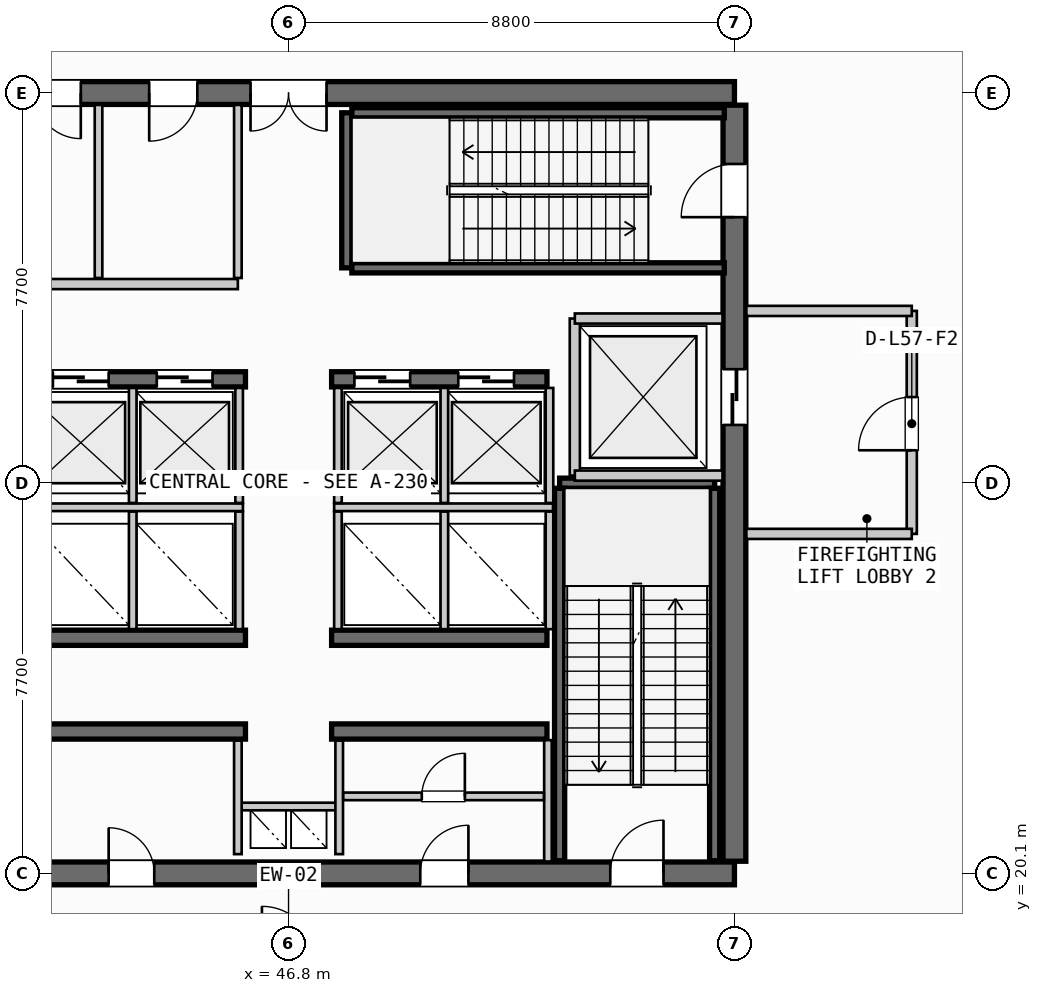
"""IFC4 building model, lengths in metres.
Left out: names, types, materials, properties, quantities, classifications, styles, units other than length and angle.
Written with IfcOpenShell. Run it as: python <this file> out.ifc"""

import sys

from ifc_helpers import new_model, si_unit, direction, frame, frame_2d, origin, place, context, subcontext, project, spatial, rectangle, extrude, source, transform, mapped, element, fill, save


model = new_model("IFC4")
c1 = context("Model", 3, precision=1e-05, world=origin(), true_north=direction((0.0, 1.0)))
c2 = subcontext(c1, "Body", "Model", "MODEL_VIEW")
j1 = project(units=[si_unit("LENGTHUNIT", "METRE"), si_unit("PLANEANGLEUNIT", "RADIAN")], contexts=[c1])
p1 = place(None, origin())
s1 = spatial("IfcSite", under=j1, at=p1, CompositionType="ELEMENT")
p2 = place(p1, origin())
s2 = spatial("IfcBuilding", under=s1, at=p2, CompositionType="ELEMENT")
p3 = place(p2, frame((0.0, 0.0, 218.4)))
s3 = spatial("IfcBuildingStorey", under=s2, at=p3, CompositionType="ELEMENT", Elevation=218.4)
p4 = place(p3, frame((38.0, 20.1, 0.0), z_axis=(0.0, 0.0, 1.0), x_axis=(1.0, 0.0, 0.0)))
e1 = element("IfcWall", 1, at=p4, inside=s3, PredefinedType="SHEAR", context=c2, shape_type="SweptSolid", body=[
    extrude(rectangle(XDim=17.6, YDim=0.45, at=frame_2d((8.8, 0.0))), origin(), (0.0, 0.0, 1.0), 4.89),
])
p5 = place(p4, frame((1.4, 0.0, 0.0)))
e2 = element("IfcOpeningElement", 2, at=p5, cuts=e1, PredefinedType="OPENING", context=c2, shape_type="SweptSolid", body=[
    extrude(rectangle(XDim=1.05, YDim=2.15, at=frame_2d((0.525, 1.075))), frame((0.0, 0.235, 0.0), z_axis=(0.0, -1.0, 0.0), x_axis=(1.0, 0.0, 0.0)), (0.0, 0.0, 1.0), 0.47),
])
p6 = place(p4, frame((15.15, 0.0, 0.0)))
e3 = element("IfcOpeningElement", 3, at=p6, cuts=e1, PredefinedType="OPENING", context=c2, shape_type="SweptSolid", body=[
    extrude(rectangle(XDim=1.05, YDim=2.15, at=frame_2d((0.525, 1.075))), frame((0.0, 0.235, 0.0), z_axis=(0.0, -1.0, 0.0), x_axis=(1.0, 0.0, 0.0)), (0.0, 0.0, 1.0), 0.47),
])
p7 = place(p4, frame((5.25, 0.0, 0.0)))
e4 = element("IfcOpeningElement", 4, at=p7, cuts=e1, PredefinedType="OPENING", context=c2, shape_type="SweptSolid", body=[
    extrude(rectangle(XDim=0.9, YDim=2.15, at=frame_2d((0.45, 1.075))), frame((0.0, 0.235, 0.0), z_axis=(0.0, -1.0, 0.0), x_axis=(1.0, 0.0, 0.0)), (0.0, 0.0, 1.0), 0.47),
])
p8 = place(p4, frame((11.4, 0.0, 0.0)))
e5 = element("IfcOpeningElement", 5, at=p8, cuts=e1, PredefinedType="OPENING", context=c2, shape_type="SweptSolid", body=[
    extrude(rectangle(XDim=0.95, YDim=2.15, at=frame_2d((0.475, 1.075))), frame((0.0, 0.235, 0.0), z_axis=(0.0, -1.0, 0.0), x_axis=(1.0, 0.0, 0.0)), (0.0, 0.0, 1.0), 0.47),
])
p9 = place(p3, frame((55.6, 35.5, 0.0), z_axis=(0.0, 0.0, 1.0), x_axis=(-1.0, 0.0, 0.0)))
e6 = element("IfcWall", 6, at=p9, inside=s3, PredefinedType="SHEAR", context=c2, shape_type="SweptSolid", body=[
    extrude(rectangle(XDim=17.6, YDim=0.45, at=frame_2d((8.8, 0.0))), origin(), (0.0, 0.0, 1.0), 4.89),
])
p10 = place(p9, frame((8.05, 0.0, 0.0)))
e7 = element("IfcOpeningElement", 7, at=p10, cuts=e6, PredefinedType="OPENING", context=c2, shape_type="SweptSolid", body=[
    extrude(rectangle(XDim=1.5, YDim=2.2, at=frame_2d((0.75, 1.1))), frame((0.0, 0.235, 0.0), z_axis=(0.0, -1.0, 0.0), x_axis=(1.0, 0.0, 0.0)), (0.0, 0.0, 1.0), 0.47),
])
p11 = place(p9, frame((15.1, 0.0, 0.0)))
e8 = element("IfcOpeningElement", 8, at=p11, cuts=e6, PredefinedType="OPENING", context=c2, shape_type="SweptSolid", body=[
    extrude(rectangle(XDim=0.95, YDim=2.15, at=frame_2d((0.475, 1.075))), frame((0.0, 0.235, 0.0), z_axis=(0.0, -1.0, 0.0), x_axis=(1.0, 0.0, 0.0)), (0.0, 0.0, 1.0), 0.47),
])
p12 = place(p9, frame((12.9, 0.0, 0.0)))
e9 = element("IfcOpeningElement", 9, at=p12, cuts=e6, PredefinedType="OPENING", context=c2, shape_type="SweptSolid", body=[
    extrude(rectangle(XDim=0.9, YDim=2.15, at=frame_2d((0.45, 1.075))), frame((0.0, 0.235, 0.0), z_axis=(0.0, -1.0, 0.0), x_axis=(1.0, 0.0, 0.0)), (0.0, 0.0, 1.0), 0.47),
])
p13 = place(p9, frame((10.6, 0.0, 0.0)))
e10 = element("IfcOpeningElement", 10, at=p13, cuts=e6, PredefinedType="OPENING", context=c2, shape_type="SweptSolid", body=[
    extrude(rectangle(XDim=0.95, YDim=2.15, at=frame_2d((0.475, 1.075))), frame((0.0, 0.235, 0.0), z_axis=(0.0, -1.0, 0.0), x_axis=(1.0, 0.0, 0.0)), (0.0, 0.0, 1.0), 0.47),
])
p14 = place(p3, frame((55.6, 20.34, 0.0), z_axis=(0.0, 0.0, 1.0), x_axis=(0.0, 1.0, 0.0)))
e11 = element("IfcWall", 11, at=p14, inside=s3, PredefinedType="SHEAR", context=c2, shape_type="SweptSolid", body=[
    extrude(rectangle(XDim=14.92, YDim=0.45, at=frame_2d((7.46, 0.0))), origin(), (0.0, 0.0, 1.0), 4.89),
])
p15 = place(p14, frame((12.71, 0.0, 0.0)))
e12 = element("IfcOpeningElement", 12, at=p15, cuts=e11, PredefinedType="OPENING", context=c2, shape_type="SweptSolid", body=[
    extrude(rectangle(XDim=1.05, YDim=2.15, at=frame_2d((0.525, 1.075))), frame((0.0, 0.235, 0.0), z_axis=(0.0, -1.0, 0.0), x_axis=(1.0, 0.0, 0.0)), (0.0, 0.0, 1.0), 0.47),
])
p16 = place(p14, frame((8.61, 0.0, 0.0)))
e13 = element("IfcOpeningElement", 13, at=p16, cuts=e11, PredefinedType="OPENING", context=c2, shape_type="SweptSolid", body=[
    extrude(rectangle(XDim=1.1, YDim=2.2, at=frame_2d((0.55, 1.1))), frame((0.0, 0.235, 0.0), z_axis=(0.0, -1.0, 0.0), x_axis=(1.0, 0.0, 0.0)), (0.0, 0.0, 1.0), 0.47),
])
for number, where, z_axis, x_axis in (
    (14, (41.7, 22.9, 0.0), (0.0, 0.0, 1.0), (1.0, 0.0, 0.0)),
    (15, (47.65, 22.9, 0.0), (0.0, 0.0, 1.0), (1.0, 0.0, 0.0)),
    (16, (41.7, 24.75, 0.0), (0.0, 0.0, 1.0), (1.0, 0.0, 0.0)),
    (17, (47.65, 24.75, 0.0), (0.0, 0.0, 1.0), (1.0, 0.0, 0.0)),
):
    element("IfcWall", number, at=place(p3, frame(where, z_axis=z_axis, x_axis=x_axis)), inside=s3, PredefinedType="SHEAR", context=c2, shape_type="SweptSolid", body=[
        extrude(rectangle(XDim=4.25, YDim=0.3, at=frame_2d((2.125, 0.0))), origin(), (0.0, 0.0, 1.0), 4.89),
    ])
p17 = place(p3, frame((41.7, 29.85, 0.0), z_axis=(0.0, 0.0, 1.0), x_axis=(1.0, 0.0, 0.0)))
e18 = element("IfcWall", 18, at=p17, inside=s3, PredefinedType="SHEAR", context=c2, shape_type="SweptSolid", body=[
    extrude(rectangle(XDim=4.25, YDim=0.3, at=frame_2d((2.125, 0.0))), origin(), (0.0, 0.0, 1.0), 4.89),
])
p18 = place(p17, frame((0.45, 0.0, 0.0)))
e19 = element("IfcOpeningElement", 19, at=p18, cuts=e18, PredefinedType="OPENING", context=c2, shape_type="SweptSolid", body=[
    extrude(rectangle(XDim=1.1, YDim=2.2, at=frame_2d((0.55, 1.1))), frame((0.0, 0.16, 0.0), z_axis=(0.0, -1.0, 0.0), x_axis=(1.0, 0.0, 0.0)), (0.0, 0.0, 1.0), 0.32),
])
p19 = place(p17, frame((2.5, 0.0, 0.0)))
e20 = element("IfcOpeningElement", 20, at=p19, cuts=e18, PredefinedType="OPENING", context=c2, shape_type="SweptSolid", body=[
    extrude(rectangle(XDim=1.1, YDim=2.2, at=frame_2d((0.55, 1.1))), frame((0.0, 0.16, 0.0), z_axis=(0.0, -1.0, 0.0), x_axis=(1.0, 0.0, 0.0)), (0.0, 0.0, 1.0), 0.32),
])
p20 = place(p3, frame((47.65, 29.85, 0.0), z_axis=(0.0, 0.0, 1.0), x_axis=(1.0, 0.0, 0.0)))
e21 = element("IfcWall", 21, at=p20, inside=s3, PredefinedType="SHEAR", context=c2, shape_type="SweptSolid", body=[
    extrude(rectangle(XDim=4.25, YDim=0.3, at=frame_2d((2.125, 0.0))), origin(), (0.0, 0.0, 1.0), 4.89),
])
p21 = place(p20, frame((0.45, 0.0, 0.0)))
e22 = element("IfcOpeningElement", 22, at=p21, cuts=e21, PredefinedType="OPENING", context=c2, shape_type="SweptSolid", body=[
    extrude(rectangle(XDim=1.1, YDim=2.2, at=frame_2d((0.55, 1.1))), frame((0.0, 0.16, 0.0), z_axis=(0.0, -1.0, 0.0), x_axis=(1.0, 0.0, 0.0)), (0.0, 0.0, 1.0), 0.32),
])
p22 = place(p20, frame((2.5, 0.0, 0.0)))
e23 = element("IfcOpeningElement", 23, at=p22, cuts=e21, PredefinedType="OPENING", context=c2, shape_type="SweptSolid", body=[
    extrude(rectangle(XDim=1.1, YDim=2.2, at=frame_2d((0.55, 1.1))), frame((0.0, 0.16, 0.0), z_axis=(0.0, -1.0, 0.0), x_axis=(1.0, 0.0, 0.0)), (0.0, 0.0, 1.0), 0.32),
])
p23 = place(p3, frame((52.15, 27.8, 0.0), z_axis=(0.0, 0.0, 1.0), x_axis=(1.0, 0.0, 0.0)))
e24 = element("IfcWall", 24, at=p23, inside=s3, PredefinedType="SHEAR", context=c2, shape_type="SweptSolid", body=[
    extrude(rectangle(XDim=3.06, YDim=0.2, at=frame_2d((1.53, 0.0))), origin(), (0.0, 0.0, 1.0), 4.89),
])
for number, where, z_axis, x_axis in (
    (25, (55.21, 27.7, 0.0), (0.0, 0.0, 1.0), (0.0, -1.0, 0.0)),
    (26, (52.15, 20.35, 0.0), (0.0, 0.0, 1.0), (0.0, 1.0, 0.0)),
):
    element("IfcWall", number, at=place(p3, frame(where, z_axis=z_axis, x_axis=x_axis)), inside=s3, PredefinedType="SHEAR", context=c2, shape_type="SweptSolid", body=[
        extrude(rectangle(XDim=7.35, YDim=0.2, at=frame_2d((3.675, 0.0))), origin(), (0.0, 0.0, 1.0), 4.89),
    ])
p24 = place(p3, frame((47.95, 32.05, 0.0), z_axis=(0.0, 0.0, 1.0), x_axis=(0.0, 1.0, 0.0)))
e27 = element("IfcWall", 27, at=p24, inside=s3, PredefinedType="SHEAR", context=c2, shape_type="SweptSolid", body=[
    extrude(rectangle(XDim=3.06, YDim=0.2, at=frame_2d((1.53, 0.0))), origin(), (0.0, 0.0, 1.0), 4.89),
])
for number, where, z_axis, x_axis in (
    (28, (48.05, 35.11, 0.0), (0.0, 0.0, 1.0), (1.0, 0.0, 0.0)),
    (29, (55.4, 32.05, 0.0), (0.0, 0.0, 1.0), (-1.0, 0.0, 0.0)),
):
    element("IfcWall", number, at=place(p3, frame(where, z_axis=z_axis, x_axis=x_axis)), inside=s3, PredefinedType="SHEAR", context=c2, shape_type="SweptSolid", body=[
        extrude(rectangle(XDim=7.35, YDim=0.2, at=frame_2d((3.675, 0.0))), origin(), (0.0, 0.0, 1.0), 4.89),
    ])
p25 = place(p3, frame((45.8, 21.42, 0.0), z_axis=(0.0, 0.0, 1.0), x_axis=(1.0, 0.0, 0.0)))
e30 = element("IfcWall", 30, at=p25, inside=s3, PredefinedType="PARTITIONING", context=c2, shape_type="SweptSolid", body=[
    extrude(rectangle(XDim=2.0, YDim=0.15, at=frame_2d((1.0, 0.0))), origin(), (0.0, 0.0, 1.0), 4.265),
])
for number, where, z_axis, x_axis in (
    (31, (45.8, 20.48, 0.0), (0.0, 0.0, 1.0), (0.0, 1.0, 0.0)),
    (32, (47.8, 20.48, 0.0), (0.0, 0.0, 1.0), (0.0, 1.0, 0.0)),
):
    element("IfcWall", number, at=place(p3, frame(where, z_axis=z_axis, x_axis=x_axis)), inside=s3, PredefinedType="PARTITIONING", context=c2, shape_type="SweptSolid", body=[
        extrude(rectangle(XDim=2.24, YDim=0.15, at=frame_2d((1.12, 0.0))), origin(), (0.0, 0.0, 1.0), 4.265),
    ])
p26 = place(p3, frame((52.45, 27.95, 0.0), z_axis=(0.0, 0.0, 1.0), x_axis=(0.0, 1.0, 0.0)))
e33 = element("IfcWall", 33, at=p26, inside=s3, PredefinedType="PARTITIONING", context=c2, shape_type="SweptSolid", body=[
    extrude(rectangle(XDim=3.1, YDim=0.2, at=frame_2d((1.55, 0.0))), origin(), (0.0, 0.0, 1.0), 4.265),
])
for number, where, z_axis, x_axis in (
    (34, (52.45, 27.95, 0.0), (0.0, 0.0, 1.0), (1.0, 0.0, 0.0)),
    (35, (52.45, 31.05, 0.0), (0.0, 0.0, 1.0), (1.0, 0.0, 0.0)),
):
    element("IfcWall", number, at=place(p3, frame(where, z_axis=z_axis, x_axis=x_axis)), inside=s3, PredefinedType="PARTITIONING", context=c2, shape_type="SweptSolid", body=[
        extrude(rectangle(XDim=2.915, YDim=0.2, at=frame_2d((1.458, 0.0))), origin(), (0.0, 0.0, 1.0), 4.265),
    ])
p27 = place(p3, frame((59.1, 26.8, 0.0), z_axis=(0.0, 0.0, 1.0), x_axis=(0.0, 1.0, 0.0)))
e36 = element("IfcWall", 36, at=p27, inside=s3, PredefinedType="PARTITIONING", context=c2, shape_type="SweptSolid", body=[
    extrude(rectangle(XDim=4.4, YDim=0.2, at=frame_2d((2.2, 0.0))), origin(), (0.0, 0.0, 1.0), 4.265),
])
p28 = place(p27, frame((1.65, 0.0, 0.0)))
e37 = element("IfcOpeningElement", 37, at=p28, cuts=e36, PredefinedType="OPENING", context=c2, shape_type="SweptSolid", body=[
    extrude(rectangle(XDim=1.05, YDim=2.15, at=frame_2d((0.525, 1.075))), frame((0.0, 0.11, 0.0), z_axis=(0.0, -1.0, 0.0), x_axis=(1.0, 0.0, 0.0)), (0.0, 0.0, 1.0), 0.22),
])
for number, where, z_axis, x_axis in (
    (38, (55.835, 26.8, 0.0), (0.0, 0.0, 1.0), (1.0, 0.0, 0.0)),
    (39, (55.835, 31.2, 0.0), (0.0, 0.0, 1.0), (1.0, 0.0, 0.0)),
):
    element("IfcWall", number, at=place(p3, frame(where, z_axis=z_axis, x_axis=x_axis)), inside=s3, PredefinedType="PARTITIONING", context=c2, shape_type="SweptSolid", body=[
        extrude(rectangle(XDim=3.265, YDim=0.2, at=frame_2d((1.633, 0.0))), origin(), (0.0, 0.0, 1.0), 4.265),
    ])
p29 = place(p3, frame((51.92, 20.335, 0.0), z_axis=(0.0, 0.0, 1.0), x_axis=(0.0, 1.0, 0.0)))
e40 = element("IfcWall", 40, at=p29, inside=s3, PredefinedType="PARTITIONING", context=c2, shape_type="SweptSolid", body=[
    extrude(rectangle(XDim=2.395, YDim=0.15, at=frame_2d((1.198, 0.0))), origin(), (0.0, 0.0, 1.0), 4.265),
])
p30 = place(p3, frame((47.88, 21.62, 0.0), z_axis=(0.0, 0.0, 1.0), x_axis=(1.0, 0.0, 0.0)))
e41 = element("IfcWall", 41, at=p30, inside=s3, PredefinedType="PARTITIONING", context=c2, shape_type="SweptSolid", body=[
    extrude(rectangle(XDim=3.96, YDim=0.15, at=frame_2d((1.98, 0.0))), origin(), (0.0, 0.0, 1.0), 4.265),
])
p31 = place(p30, frame((1.55, 0.0, 0.0)))
e42 = element("IfcOpeningElement", 42, at=p31, cuts=e41, PredefinedType="OPENING", context=c2, shape_type="SweptSolid", body=[
    extrude(rectangle(XDim=0.85, YDim=2.15, at=frame_2d((0.425, 1.075))), frame((0.0, 0.085, 0.0), z_axis=(0.0, -1.0, 0.0), x_axis=(1.0, 0.0, 0.0)), (0.0, 0.0, 1.0), 0.17),
])
p32 = place(p3, frame((41.58, 27.325, 0.0), z_axis=(0.0, 0.0, 1.0), x_axis=(1.0, 0.0, 0.0)))
e43 = element("IfcWall", 43, at=p32, inside=s3, PredefinedType="PARTITIONING", context=c2, shape_type="SweptSolid", body=[
    extrude(rectangle(XDim=4.32, YDim=0.15, at=frame_2d((2.16, 0.0))), origin(), (0.0, 0.0, 1.0), 4.265),
])
p33 = place(p3, frame((47.7, 27.325, 0.0), z_axis=(0.0, 0.0, 1.0), x_axis=(1.0, 0.0, 0.0)))
e44 = element("IfcWall", 44, at=p33, inside=s3, PredefinedType="PARTITIONING", context=c2, shape_type="SweptSolid", body=[
    extrude(rectangle(XDim=4.32, YDim=0.15, at=frame_2d((2.16, 0.0))), origin(), (0.0, 0.0, 1.0), 4.265),
])
for number, where, z_axis, x_axis in (
    (45, (43.725, 24.92, 0.0), (0.0, 0.0, 1.0), (0.0, 1.0, 0.0)),
    (46, (45.825, 24.92, 0.0), (0.0, 0.0, 1.0), (0.0, 1.0, 0.0)),
    (47, (47.775, 24.92, 0.0), (0.0, 0.0, 1.0), (0.0, 1.0, 0.0)),
    (48, (49.875, 24.92, 0.0), (0.0, 0.0, 1.0), (0.0, 1.0, 0.0)),
    (49, (51.95, 24.92, 0.0), (0.0, 0.0, 1.0), (0.0, 1.0, 0.0)),
):
    element("IfcWall", number, at=place(p3, frame(where, z_axis=z_axis, x_axis=x_axis)), inside=s3, PredefinedType="PARTITIONING", context=c2, shape_type="SweptSolid", body=[
        extrude(rectangle(XDim=2.32, YDim=0.15, at=frame_2d((1.16, 0.0))), origin(), (0.0, 0.0, 1.0), 4.265),
    ])
for number, where, z_axis, x_axis in (
    (50, (43.725, 27.41, 0.0), (0.0, 0.0, 1.0), (0.0, 1.0, 0.0)),
    (51, (45.825, 27.41, 0.0), (0.0, 0.0, 1.0), (0.0, 1.0, 0.0)),
    (52, (47.775, 27.41, 0.0), (0.0, 0.0, 1.0), (0.0, 1.0, 0.0)),
    (53, (49.875, 27.41, 0.0), (0.0, 0.0, 1.0), (0.0, 1.0, 0.0)),
    (54, (51.95, 27.41, 0.0), (0.0, 0.0, 1.0), (0.0, 1.0, 0.0)),
):
    element("IfcWall", number, at=place(p3, frame(where, z_axis=z_axis, x_axis=x_axis)), inside=s3, PredefinedType="PARTITIONING", context=c2, shape_type="SweptSolid", body=[
        extrude(rectangle(XDim=2.27, YDim=0.15, at=frame_2d((1.135, 0.0))), origin(), (0.0, 0.0, 1.0), 4.265),
    ])
p34 = place(p3, frame((38.235, 31.73, 0.0), z_axis=(0.0, 0.0, 1.0), x_axis=(1.0, 0.0, 0.0)))
e55 = element("IfcWall", 55, at=p34, inside=s3, PredefinedType="PARTITIONING", context=c2, shape_type="SweptSolid", body=[
    extrude(rectangle(XDim=7.565, YDim=0.2, at=frame_2d((3.782, 0.0))), origin(), (0.0, 0.0, 1.0), 4.265),
])
p35 = place(p3, frame((45.8, 31.85, 0.0), z_axis=(0.0, 0.0, 1.0), x_axis=(0.0, 1.0, 0.0)))
e56 = element("IfcWall", 56, at=p35, inside=s3, PredefinedType="PARTITIONING", context=c2, shape_type="SweptSolid", body=[
    extrude(rectangle(XDim=3.415, YDim=0.15, at=frame_2d((1.708, 0.0))), origin(), (0.0, 0.0, 1.0), 4.265),
])
p36 = place(p3, frame((43.05, 31.85, 0.0), z_axis=(0.0, 0.0, 1.0), x_axis=(0.0, 1.0, 0.0)))
e57 = element("IfcWall", 57, at=p36, inside=s3, PredefinedType="PLUMBINGWALL", context=c2, shape_type="SweptSolid", body=[
    extrude(rectangle(XDim=3.415, YDim=0.15, at=frame_2d((1.708, 0.0))), origin(), (0.0, 0.0, 1.0), 4.265),
])
m1 = source(origin(), c2, "Body", "SweptSolid", [
    extrude(rectangle(XDim=1.05, YDim=2.15, at=frame_2d((0.525, 1.075))), frame((0.0, 0.025, 0.0), z_axis=(0.0, -1.0, 0.0), x_axis=(1.0, 0.0, 0.0)), (0.0, 0.0, 1.0), 0.05),
])
p37 = place(p6, origin())
e58 = element("IfcDoor", 58, at=p37, inside=s3, OperationType="SINGLE_SWING_RIGHT", PredefinedType="DOOR", context=c2, shape_type="MappedRepresentation", body=[
    mapped(m1, transform((0.0, 0.0, 0.0), scale=1.0)),
])
fill(e3, e58)
p38 = place(p15, origin())
e59 = element("IfcDoor", 59, at=p38, inside=s3, OperationType="SINGLE_SWING_LEFT", PredefinedType="DOOR", context=c2, shape_type="MappedRepresentation", body=[
    mapped(m1, transform((0.0, 0.0, 0.0), scale=1.0)),
])
fill(e12, e59)
m2 = source(origin(), c2, "Body", "SweptSolid", [
    extrude(rectangle(XDim=1.5, YDim=2.2, at=frame_2d((0.75, 1.1))), frame((0.0, 0.025, 0.0), z_axis=(0.0, -1.0, 0.0), x_axis=(1.0, 0.0, 0.0)), (0.0, 0.0, 1.0), 0.05),
])
p39 = place(p10, origin())
e60 = element("IfcDoor", 60, at=p39, inside=s3, OperationType="DOUBLE_DOOR_SINGLE_SWING", PredefinedType="DOOR", context=c2, shape_type="MappedRepresentation", body=[
    mapped(m2, transform((0.0, 0.0, 0.0), scale=1.0)),
])
fill(e7, e60)
m3 = source(origin(), c2, "Body", "SweptSolid", [
    extrude(rectangle(XDim=1.1, YDim=2.2, at=frame_2d((0.55, 1.1))), frame((0.0, 0.025, 0.0), z_axis=(0.0, -1.0, 0.0), x_axis=(1.0, 0.0, 0.0)), (0.0, 0.0, 1.0), 0.05),
])
p40 = place(p16, origin())
e61 = element("IfcDoor", 61, at=p40, inside=s3, OperationType="SLIDING_TO_RIGHT", PredefinedType="DOOR", context=c2, shape_type="MappedRepresentation", body=[
    mapped(m3, transform((0.0, 0.0, 0.0), scale=1.0)),
])
fill(e13, e61)
m4 = source(origin(), c2, "Body", "SweptSolid", [
    extrude(rectangle(XDim=0.9, YDim=2.15, at=frame_2d((0.45, 1.075))), frame((0.0, 0.025, 0.0), z_axis=(0.0, -1.0, 0.0), x_axis=(1.0, 0.0, 0.0)), (0.0, 0.0, 1.0), 0.05),
])
p41 = place(p7, origin())
e62 = element("IfcDoor", 62, at=p41, inside=s3, OperationType="SINGLE_SWING_LEFT", PredefinedType="DOOR", context=c2, shape_type="MappedRepresentation", body=[
    mapped(m4, transform((0.0, 0.0, 0.0), scale=1.0)),
])
fill(e4, e62)
m5 = source(origin(), c2, "Body", "SweptSolid", [
    extrude(rectangle(XDim=0.95, YDim=2.15, at=frame_2d((0.475, 1.075))), frame((0.0, 0.025, 0.0), z_axis=(0.0, -1.0, 0.0), x_axis=(1.0, 0.0, 0.0)), (0.0, 0.0, 1.0), 0.05),
])
p42 = place(p8, origin())
e63 = element("IfcDoor", 63, at=p42, inside=s3, OperationType="SINGLE_SWING_RIGHT", PredefinedType="DOOR", context=c2, shape_type="MappedRepresentation", body=[
    mapped(m5, transform((0.0, 0.0, 0.0), scale=1.0)),
])
fill(e5, e63)
p43 = place(p18, origin())
e64 = element("IfcDoor", 64, at=p43, inside=s3, OperationType="SLIDING_TO_LEFT", PredefinedType="DOOR", context=c2, shape_type="MappedRepresentation", body=[
    mapped(m3, transform((0.0, 0.0, 0.0), scale=1.0)),
])
fill(e19, e64)
p44 = place(p19, origin())
e65 = element("IfcDoor", 65, at=p44, inside=s3, OperationType="SLIDING_TO_LEFT", PredefinedType="DOOR", context=c2, shape_type="MappedRepresentation", body=[
    mapped(m3, transform((0.0, 0.0, 0.0), scale=1.0)),
])
fill(e20, e65)
p45 = place(p21, origin())
e66 = element("IfcDoor", 66, at=p45, inside=s3, OperationType="SLIDING_TO_LEFT", PredefinedType="DOOR", context=c2, shape_type="MappedRepresentation", body=[
    mapped(m3, transform((0.0, 0.0, 0.0), scale=1.0)),
])
fill(e22, e66)
p46 = place(p22, origin())
e67 = element("IfcDoor", 67, at=p46, inside=s3, OperationType="SLIDING_TO_LEFT", PredefinedType="DOOR", context=c2, shape_type="MappedRepresentation", body=[
    mapped(m3, transform((0.0, 0.0, 0.0), scale=1.0)),
])
fill(e23, e67)
p47 = place(p12, origin())
e68 = element("IfcDoor", 68, at=p47, inside=s3, OperationType="SINGLE_SWING_LEFT", PredefinedType="DOOR", context=c2, shape_type="MappedRepresentation", body=[
    mapped(m4, transform((0.0, 0.0, 0.0), scale=1.0)),
])
fill(e9, e68)
p48 = place(p13, origin())
e69 = element("IfcDoor", 69, at=p48, inside=s3, OperationType="SINGLE_SWING_RIGHT", PredefinedType="DOOR", context=c2, shape_type="MappedRepresentation", body=[
    mapped(m5, transform((0.0, 0.0, 0.0), scale=1.0)),
])
fill(e10, e69)
p49 = place(p28, origin())
e70 = element("IfcDoor", 70, at=p49, inside=s3, OperationType="SINGLE_SWING_LEFT", PredefinedType="DOOR", context=c2, shape_type="MappedRepresentation", body=[
    mapped(m1, transform((0.0, 0.0, 0.0), scale=1.0)),
])
fill(e37, e70)
m6 = source(origin(), c2, "Body", "SweptSolid", [
    extrude(rectangle(XDim=0.85, YDim=2.15, at=frame_2d((0.425, 1.075))), frame((0.0, 0.025, 0.0), z_axis=(0.0, -1.0, 0.0), x_axis=(1.0, 0.0, 0.0)), (0.0, 0.0, 1.0), 0.05),
])
p50 = place(p31, origin())
e71 = element("IfcDoor", 71, at=p50, inside=s3, OperationType="SINGLE_SWING_RIGHT", PredefinedType="DOOR", context=c2, shape_type="MappedRepresentation", body=[
    mapped(m6, transform((0.0, 0.0, 0.0), scale=1.0)),
])
fill(e42, e71)
save(model, sys.argv[1])
